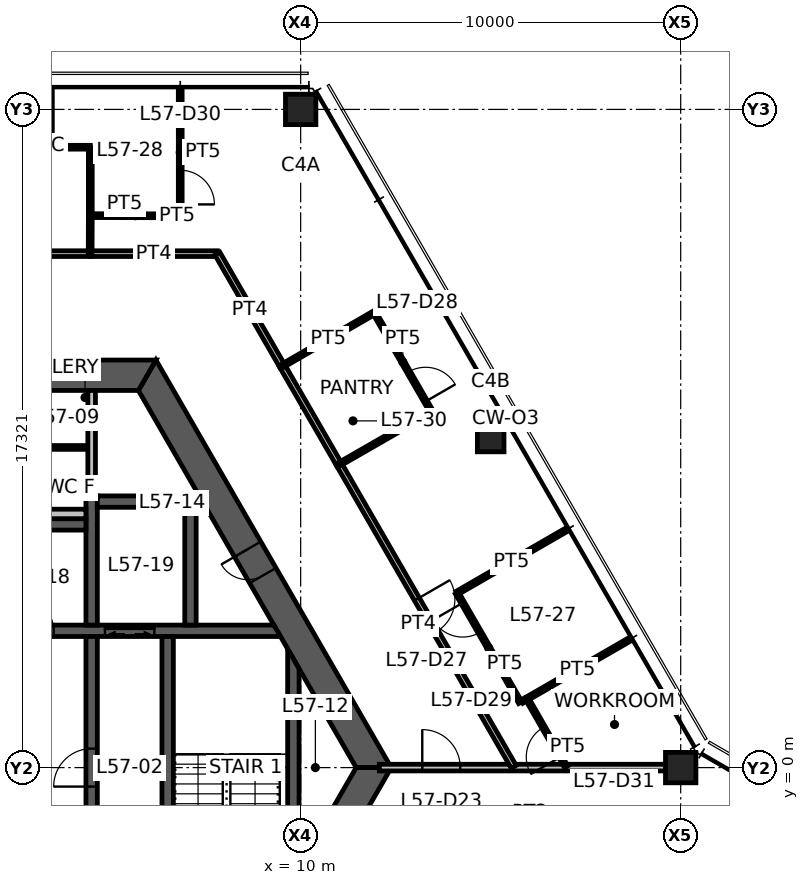
"""IFC4 building model, lengths in metres.
Left out: names, types, materials, properties, quantities, classifications, styles, units other than length and angle.
Written with IfcOpenShell. Run it as: python <this file> out.ifc"""

import sys

from ifc_helpers import new_model, si_unit, direction, frame, frame_2d, origin, origin_2d, place, context, subcontext, project, spatial, polyline, rectangle, hollow_rectangle, outline, extrude, element, fill, save


model = new_model("IFC4")
c1 = context("Model", 3, precision=1e-05, world=origin(), true_north=direction((0.0, 1.0)))
c2 = subcontext(c1, "Body", "Model", "MODEL_VIEW")
j1 = project(units=[si_unit("LENGTHUNIT", "METRE"), si_unit("PLANEANGLEUNIT", "RADIAN")], contexts=[c1])
p1 = place(None, origin())
s1 = spatial("IfcSite", under=j1, at=p1, CompositionType="ELEMENT")
p2 = place(p1, origin())
s2 = spatial("IfcBuilding", under=s1, at=p2, CompositionType="ELEMENT")
p3 = place(p2, frame((0.0, 0.0, 228.4)))
s3 = spatial("IfcBuildingStorey", under=s2, at=p3, CompositionType="ELEMENT", Elevation=228.4)
for number, where, z_axis, x_axis in (
    (1, (20.0, 0.0, 0.0), (0.0, 0.0, 1.0), (1.0, 0.0, 0.0)),
    (2, (10.0, 17.321, 0.0), (0.0, 0.0, 1.0), (1.0, 0.0, 0.0)),
):
    element("IfcColumn", number, at=place(p3, frame(where, z_axis=z_axis, x_axis=x_axis)), inside=s3, PredefinedType="COLUMN", context=c2, shape_type="SweptSolid", body=[
        extrude(hollow_rectangle(XDim=0.8, YDim=0.8, WallThickness=0.04, at=origin_2d()), origin(), (0.0, 0.0, 1.0), 3.9),
    ])
p4 = place(p3, frame((15.0, 8.66, 0.0), z_axis=(0.0, 0.0, 1.0), x_axis=(1.0, 0.0, 0.0)))
e3 = element("IfcColumn", 3, at=p4, inside=s3, PredefinedType="COLUMN", context=c2, shape_type="SweptSolid", body=[
    extrude(hollow_rectangle(XDim=0.7, YDim=0.7, WallThickness=0.032, at=origin_2d()), origin(), (0.0, 0.0, 1.0), 3.9),
])
p5 = place(p3, frame((11.922, 0.0, 0.0), z_axis=(0.0, 0.0, 1.0), x_axis=(-0.500004296715, 0.866022923061, 0.0)))
e4 = element("IfcWall", 4, at=p5, inside=s3, PredefinedType="SHEAR", context=c2, shape_type="SweptSolid", body=[
    extrude(outline(polyline([(-0.231, -0.4), (5.835, -0.4), (6.635, -0.4), (12.153, -0.4), (11.691, 0.4), (6.635, 0.4), (5.835, 0.4), (0.231, 0.4), (-0.231, -0.4)])), origin(), (0.0, 0.0, 1.0), 3.9),
])
p6 = place(p5, frame((5.835, 0.0, 0.0)))
e5 = element("IfcOpeningElement", 5, at=p6, cuts=e4, PredefinedType="OPENING", context=c2, shape_type="SweptSolid", body=[
    extrude(rectangle(XDim=0.8, YDim=2.1, at=frame_2d((0.4, 1.05))), frame((0.0, 0.41, 0.0), z_axis=(0.0, -1.0, 0.0), x_axis=(1.0, 0.0, 0.0)), (0.0, 0.0, 1.0), 0.82),
])
p7 = place(p3, frame((5.961, 10.325, 0.0), z_axis=(0.0, 0.0, 1.0), x_axis=(-1.0, 0.0, 0.0)))
e6 = element("IfcWall", 6, at=p7, inside=s3, PredefinedType="SHEAR", context=c2, shape_type="SweptSolid", body=[
    extrude(outline(polyline([(-0.231, -0.4), (4.636, -0.4), (5.536, -0.4), (6.386, -0.4), (7.286, -0.4), (12.153, -0.4), (11.691, 0.4), (7.286, 0.4), (6.386, 0.4), (5.536, 0.4), (4.636, 0.4), (0.231, 0.4), (-0.231, -0.4)])), origin(), (0.0, 0.0, 1.0), 3.9),
])
p8 = place(p7, frame((6.386, 0.0, 0.0)))
e7 = element("IfcOpeningElement", 7, at=p8, cuts=e6, PredefinedType="OPENING", context=c2, shape_type="SweptSolid", body=[
    extrude(rectangle(XDim=0.9, YDim=2.1, at=frame_2d((0.45, 1.05))), frame((0.0, 0.41, 0.0), z_axis=(0.0, -1.0, 0.0), x_axis=(1.0, 0.0, 0.0)), (0.0, 0.0, 1.0), 0.82),
])
p9 = place(p7, frame((4.636, 0.0, 0.0)))
e8 = element("IfcOpeningElement", 8, at=p9, cuts=e6, PredefinedType="OPENING", context=c2, shape_type="SweptSolid", body=[
    extrude(rectangle(XDim=0.9, YDim=2.1, at=frame_2d((0.45, 1.05))), frame((0.0, 0.41, 0.0), z_axis=(0.0, -1.0, 0.0), x_axis=(1.0, 0.0, 0.0)), (0.0, 0.0, 1.0), 0.82),
])
p10 = place(p3, frame((5.961, -10.325, 0.0), z_axis=(0.0, 0.0, 1.0), x_axis=(0.500004296715, 0.866022923061, 0.0)))
e9 = element("IfcWall", 9, at=p10, inside=s3, PredefinedType="SHEAR", context=c2, shape_type="SweptSolid", body=[
    extrude(outline(polyline([(-0.231, -0.4), (4.594, -0.4), (5.394, -0.4), (12.153, -0.4), (11.691, 0.4), (5.394, 0.4), (4.594, 0.4), (0.231, 0.4), (-0.231, -0.4)])), origin(), (0.0, 0.0, 1.0), 3.9),
])
p11 = place(p10, frame((4.594, 0.0, 0.0)))
e10 = element("IfcOpeningElement", 10, at=p11, cuts=e9, PredefinedType="OPENING", context=c2, shape_type="SweptSolid", body=[
    extrude(rectangle(XDim=0.8, YDim=2.1, at=frame_2d((0.4, 1.05))), frame((0.0, 0.41, 0.0), z_axis=(0.0, -1.0, 0.0), x_axis=(1.0, 0.0, 0.0)), (0.0, 0.0, 1.0), 0.82),
])
p12 = place(p3, frame((1.45, 3.6, 0.0), z_axis=(0.0, 0.0, 1.0), x_axis=(1.0, 0.0, 0.0)))
e11 = element("IfcWall", 11, at=p12, inside=s3, PredefinedType="SHEAR", context=c2, shape_type="SweptSolid", body=[
    extrude(outline(polyline([(0.0, -0.15), (1.15, -0.15), (2.05, -0.15), (3.4, -0.15), (4.7, -0.15), (8.019, -0.15), (7.845, 0.15), (4.7, 0.15), (3.4, 0.15), (2.05, 0.15), (1.15, 0.15), (0.0, 0.15), (0.0, -0.15)])), origin(), (0.0, 0.0, 1.0), 3.9),
])
p13 = place(p12, frame((1.15, 0.0, 0.0)))
e12 = element("IfcOpeningElement", 12, at=p13, cuts=e11, PredefinedType="OPENING", context=c2, shape_type="SweptSolid", body=[
    extrude(rectangle(XDim=0.9, YDim=2.1, at=frame_2d((0.45, 1.05))), frame((0.0, 0.16, 0.0), z_axis=(0.0, -1.0, 0.0), x_axis=(1.0, 0.0, 0.0)), (0.0, 0.0, 1.0), 0.32),
])
p14 = place(p12, frame((3.4, 0.0, 0.0)))
e13 = element("IfcOpeningElement", 13, at=p14, cuts=e11, PredefinedType="OPENING", context=c2, shape_type="SweptSolid", body=[
    extrude(rectangle(XDim=1.3, YDim=2.1, at=frame_2d((0.65, 1.05))), frame((0.0, 0.16, 0.0), z_axis=(0.0, -1.0, 0.0), x_axis=(1.0, 0.0, 0.0)), (0.0, 0.0, 1.0), 0.32),
])
p15 = place(p3, frame((4.5, -3.45, 0.0), z_axis=(0.0, 0.0, 1.0), x_axis=(0.0, 1.0, 0.0)))
e14 = element("IfcWall", 14, at=p15, inside=s3, PredefinedType="SHEAR", context=c2, shape_type="SweptSolid", body=[
    extrude(rectangle(XDim=6.9, YDim=0.3, at=frame_2d((3.45, 0.0))), origin(), (0.0, 0.0, 1.0), 3.9),
])
p16 = place(p15, frame((2.95, 0.0, 0.0)))
e15 = element("IfcOpeningElement", 15, at=p16, cuts=e14, PredefinedType="OPENING", context=c2, shape_type="SweptSolid", body=[
    extrude(rectangle(XDim=1.0, YDim=2.1, at=frame_2d((0.5, 1.05))), frame((0.0, 0.16, 0.0), z_axis=(0.0, -1.0, 0.0), x_axis=(1.0, 0.0, 0.0)), (0.0, 0.0, 1.0), 0.32),
])
p17 = place(p3, frame((6.5, -3.45, 0.0), z_axis=(0.0, 0.0, 1.0), x_axis=(0.0, 1.0, 0.0)))
e16 = element("IfcWall", 16, at=p17, inside=s3, PredefinedType="SHEAR", context=c2, shape_type="SweptSolid", body=[
    extrude(rectangle(XDim=6.9, YDim=0.3, at=frame_2d((3.45, 0.0))), origin(), (0.0, 0.0, 1.0), 3.9),
])
p18 = place(p17, frame((0.1, 0.0, 0.0)))
e17 = element("IfcOpeningElement", 17, at=p18, cuts=e16, PredefinedType="OPENING", context=c2, shape_type="SweptSolid", body=[
    extrude(rectangle(XDim=1.0, YDim=2.1, at=frame_2d((0.5, 1.05))), frame((0.0, 0.16, 0.0), z_axis=(0.0, -1.0, 0.0), x_axis=(1.0, 0.0, 0.0)), (0.0, 0.0, 1.0), 0.32),
])
p19 = place(p3, frame((4.5, 3.75, 0.0), z_axis=(0.0, 0.0, 1.0), x_axis=(0.0, 1.0, 0.0)))
e18 = element("IfcWall", 18, at=p19, inside=s3, PredefinedType="SHEAR", context=c2, shape_type="SweptSolid", body=[
    extrude(rectangle(XDim=3.4, YDim=0.3, at=frame_2d((1.7, 0.0))), origin(), (0.0, 0.0, 1.0), 3.9),
])
for number, where, z_axis, x_axis in (
    (19, (1.75, 6.4, 0.0), (0.0, 0.0, 1.0), (1.0, 0.0, 0.0)),
    (20, (4.65, 7.0, 0.0), (0.0, 0.0, 1.0), (1.0, 0.0, 0.0)),
):
    element("IfcWall", number, at=place(p3, frame(where, z_axis=z_axis, x_axis=x_axis)), inside=s3, PredefinedType="SHEAR", context=c2, shape_type="SweptSolid", body=[
        extrude(rectangle(XDim=2.6, YDim=0.3, at=frame_2d((1.3, 0.0))), origin(), (0.0, 0.0, 1.0), 3.9),
    ])
p20 = place(p3, frame((7.1, 3.75, 0.0), z_axis=(0.0, 0.0, 1.0), x_axis=(0.0, 1.0, 0.0)))
e21 = element("IfcWall", 21, at=p20, inside=s3, PredefinedType="SHEAR", context=c2, shape_type="SweptSolid", body=[
    extrude(rectangle(XDim=3.1, YDim=0.3, at=frame_2d((1.55, 0.0))), origin(), (0.0, 0.0, 1.0), 3.9),
])
p21 = place(p3, frame((9.808, -2.862, 0.0), z_axis=(0.0, 0.0, 1.0), x_axis=(0.0, 1.0, 0.0)))
e22 = element("IfcWall", 22, at=p21, inside=s3, PredefinedType="SHEAR", context=c2, shape_type="SweptSolid", body=[
    extrude(outline(polyline([(0.26, -0.15), (5.465, -0.15), (5.984, 0.15), (-0.26, 0.15), (0.26, -0.15)])), origin(), (0.0, 0.0, 1.0), 3.9),
])
p22 = place(p3, frame((4.5, 7.15, 0.0), z_axis=(0.0, 0.0, 1.0), x_axis=(0.0, 1.0, 0.0)))
e23 = element("IfcWall", 23, at=p22, inside=s3, PredefinedType="STANDARD", context=c2, shape_type="SweptSolid", body=[
    extrude(rectangle(XDim=2.775, YDim=0.2, at=frame_2d((1.388, 0.0))), origin(), (0.0, 0.0, 1.0), 3.9),
])
p23 = place(p3, frame((1.75, 6.675, 0.0), z_axis=(0.0, 0.0, 1.0), x_axis=(1.0, 0.0, 0.0)))
e24 = element("IfcWall", 24, at=p23, inside=s3, PredefinedType="PLUMBINGWALL", context=c2, shape_type="SweptSolid", body=[
    extrude(rectangle(XDim=2.6, YDim=0.25, at=frame_2d((1.3, 0.0))), origin(), (0.0, 0.0, 1.0), 3.9),
])
p24 = place(p3, frame((3.3, 8.425, 0.0), z_axis=(0.0, 0.0, 1.0), x_axis=(1.0, 0.0, 0.0)))
e25 = element("IfcWall", 25, at=p24, inside=s3, PredefinedType="PARTITIONING", context=c2, shape_type="SweptSolid", body=[
    extrude(rectangle(XDim=1.05, YDim=0.1, at=frame_2d((0.525, 0.0))), origin(), (0.0, 0.0, 1.0), 2.95),
])
p25 = place(p3, frame((12.07, 0.0, 0.0), z_axis=(0.0, 0.0, 1.0), x_axis=(1.0, 0.0, 0.0)))
e26 = element("IfcWall", 26, at=p25, inside=s3, PredefinedType="PARTITIONING", context=c2, shape_type="SweptSolid", body=[
    extrude(rectangle(XDim=7.93, YDim=0.175, at=frame_2d((3.965, 0.0))), origin(), (0.0, 0.0, 1.0), 3.05),
])
p26 = place(p25, frame((1.13, 0.0, 0.0)))
e27 = element("IfcOpeningElement", 27, at=p26, cuts=e26, PredefinedType="OPENING", context=c2, shape_type="SweptSolid", body=[
    extrude(rectangle(XDim=1.0, YDim=2.1, at=frame_2d((0.5, 1.05))), frame((0.0, 0.098, 0.0), z_axis=(0.0, -1.0, 0.0), x_axis=(1.0, 0.0, 0.0)), (0.0, 0.0, 1.0), 0.195),
])
p27 = place(p3, frame((0.32, 13.525, 0.0), z_axis=(0.0, 0.0, 1.0), x_axis=(1.0, 0.0, 0.0)))
e28 = element("IfcWall", 28, at=p27, inside=s3, PredefinedType="PARTITIONING", context=c2, shape_type="SweptSolid", body=[
    extrude(rectangle(XDim=4.15, YDim=0.15, at=frame_2d((2.075, 0.0))), origin(), (0.0, 0.0, 1.0), 2.95),
])
p28 = place(p27, frame((1.575, 0.0, 0.0)))
e29 = element("IfcOpeningElement", 29, at=p28, cuts=e28, PredefinedType="OPENING", context=c2, shape_type="SweptSolid", body=[
    extrude(rectangle(XDim=1.0, YDim=2.1, at=frame_2d((0.5, 1.05))), frame((0.0, 0.085, 0.0), z_axis=(0.0, -1.0, 0.0), x_axis=(1.0, 0.0, 0.0)), (0.0, 0.0, 1.0), 0.17),
])
p29 = place(p3, frame((9.51, 10.577, 0.0), z_axis=(0.0, 0.0, 1.0), x_axis=(0.499977562641, -0.866038357612, 0.0)))
e30 = element("IfcWall", 30, at=p29, inside=s3, PredefinedType="PARTITIONING", context=c2, shape_type="SweptSolid", body=[
    extrude(rectangle(XDim=3.01, YDim=0.15, at=frame_2d((1.505, 0.0))), origin(), (0.0, 0.0, 1.0), 2.95),
])
p30 = place(p3, frame((4.46, 13.525, 0.0), z_axis=(0.0, 0.0, 1.0), x_axis=(1.0, 0.0, 0.0)))
e31 = element("IfcWall", 31, at=p30, inside=s3, PredefinedType="PARTITIONING", context=c2, shape_type="SweptSolid", body=[
    extrude(rectangle(XDim=3.348, YDim=0.15, at=frame_2d((1.674, 0.0))), origin(), (0.0, 0.0, 1.0), 2.95),
])
p31 = place(p3, frame((7.809, 13.525, 0.0), z_axis=(0.0, 0.0, 1.0), x_axis=(0.500001088571, -0.866024775297, 0.0)))
e32 = element("IfcWall", 32, at=p31, inside=s3, PredefinedType="PARTITIONING", context=c2, shape_type="SweptSolid", body=[
    extrude(rectangle(XDim=3.413, YDim=0.15, at=frame_2d((1.707, 0.0))), origin(), (0.0, 0.0, 1.0), 2.95),
])
p32 = place(p3, frame((11.011, 7.979, 0.0), z_axis=(0.0, 0.0, 1.0), x_axis=(0.49999917462, -0.866025880317, 0.0)))
e33 = element("IfcWall", 33, at=p32, inside=s3, PredefinedType="PARTITIONING", context=c2, shape_type="SweptSolid", body=[
    extrude(rectangle(XDim=9.19, YDim=0.15, at=frame_2d((4.595, 0.0))), origin(), (0.0, 0.0, 1.0), 2.95),
])
p33 = place(p32, frame((4.095, 0.0, 0.0)))
e34 = element("IfcOpeningElement", 34, at=p33, cuts=e33, PredefinedType="OPENING", context=c2, shape_type="SweptSolid", body=[
    extrude(rectangle(XDim=1.0, YDim=2.1, at=frame_2d((0.5, 1.05))), frame((0.0, 0.085, 0.0), z_axis=(0.0, -1.0, 0.0), x_axis=(1.0, 0.0, 0.0)), (0.0, 0.0, 1.0), 0.17),
])
p34 = place(p3, frame((3.415, 16.325, 0.0), z_axis=(0.0, 0.0, 1.0), x_axis=(1.0, 0.0, 0.0)))
e35 = element("IfcWall", 35, at=p34, inside=s3, PredefinedType="PARTITIONING", context=c2, shape_type="SweptSolid", body=[
    extrude(rectangle(XDim=1.05, YDim=0.1, at=frame_2d((0.525, 0.0))), origin(), (0.0, 0.0, 1.0), 2.95),
])
p35 = place(p3, frame((4.465, 16.325, 0.0), z_axis=(0.0, 0.0, 1.0), x_axis=(0.0, -1.0, 0.0)))
e36 = element("IfcWall", 36, at=p35, inside=s3, PredefinedType="PARTITIONING", context=c2, shape_type="SweptSolid", body=[
    extrude(rectangle(XDim=1.81, YDim=0.1, at=frame_2d((0.905, 0.0))), origin(), (0.0, 0.0, 1.0), 2.95),
])
p36 = place(p3, frame((4.465, 14.525, 0.0), z_axis=(0.0, 0.0, 1.0), x_axis=(-0.00463862197, -0.999989241535, 0.0)))
e37 = element("IfcWall", 37, at=p36, inside=s3, PredefinedType="PARTITIONING", context=c2, shape_type="SweptSolid", body=[
    extrude(rectangle(XDim=1.0, YDim=0.1, at=frame_2d((0.5, 0.0))), origin(), (0.0, 0.0, 1.0), 2.95),
])
p37 = place(p3, frame((9.515, 10.569, 0.0), z_axis=(0.0, 0.0, 1.0), x_axis=(0.865255114713, 0.501331812737, 0.0)))
e38 = element("IfcWall", 38, at=p37, inside=s3, PredefinedType="PARTITIONING", context=c2, shape_type="SweptSolid", body=[
    extrude(rectangle(XDim=2.8, YDim=0.1, at=frame_2d((1.4, 0.0))), origin(), (0.0, 0.0, 1.0), 2.95),
])
p38 = place(p3, frame((11.938, 11.973, 0.0), z_axis=(0.0, 0.0, 1.0), x_axis=(0.50002537861, -0.866010750942, 0.0)))
e39 = element("IfcWall", 39, at=p38, inside=s3, PredefinedType="PARTITIONING", context=c2, shape_type="SweptSolid", body=[
    extrude(rectangle(XDim=3.0, YDim=0.1, at=frame_2d((1.5, 0.0))), origin(), (0.0, 0.0, 1.0), 2.95),
])
p39 = place(p38, frame((1.8, 0.0, 0.0)))
e40 = element("IfcOpeningElement", 40, at=p39, cuts=e39, PredefinedType="OPENING", context=c2, shape_type="SweptSolid", body=[
    extrude(rectangle(XDim=0.9, YDim=2.1, at=frame_2d((0.45, 1.05))), frame((0.0, 0.06, 0.0), z_axis=(0.0, -1.0, 0.0), x_axis=(1.0, 0.0, 0.0)), (0.0, 0.0, 1.0), 0.12),
])
p40 = place(p3, frame((13.438, 9.375, 0.0), z_axis=(0.0, 0.0, 1.0), x_axis=(-0.866817750494, -0.498625097071, 0.0)))
e41 = element("IfcWall", 41, at=p40, inside=s3, PredefinedType="PARTITIONING", context=c2, shape_type="SweptSolid", body=[
    extrude(rectangle(XDim=2.8, YDim=0.1, at=frame_2d((1.4, 0.0))), origin(), (0.0, 0.0, 1.0), 2.95),
])
p41 = place(p3, frame((18.62, 3.351, 0.0), z_axis=(0.0, 0.0, 1.0), x_axis=(-0.866043267704, -0.499969057507, 0.0)))
e42 = element("IfcWall", 42, at=p41, inside=s3, PredefinedType="PARTITIONING", context=c2, shape_type="SweptSolid", body=[
    extrude(rectangle(XDim=3.085, YDim=0.1, at=frame_2d((1.542, 0.0))), origin(), (0.0, 0.0, 1.0), 2.95),
])
p42 = place(p3, frame((14.114, 4.595, 0.0), z_axis=(0.0, 0.0, 1.0), x_axis=(0.866033287653, 0.49998634449, 0.0)))
e43 = element("IfcWall", 43, at=p42, inside=s3, PredefinedType="PARTITIONING", context=c2, shape_type="SweptSolid", body=[
    extrude(rectangle(XDim=3.31, YDim=0.1, at=frame_2d((1.655, 0.0))), origin(), (0.0, 0.0, 1.0), 2.95),
])
p43 = place(p3, frame((15.779, 1.71, 0.0), z_axis=(0.0, 0.0, 1.0), x_axis=(-0.500001606164, 0.866024476463, 0.0)))
e44 = element("IfcWall", 44, at=p43, inside=s3, PredefinedType="PARTITIONING", context=c2, shape_type="SweptSolid", body=[
    extrude(rectangle(XDim=3.331, YDim=0.1, at=frame_2d((1.666, 0.0))), origin(), (0.0, 0.0, 1.0), 2.95),
])
p44 = place(p43, frame((2.131, 0.0, 0.0)))
e45 = element("IfcOpeningElement", 45, at=p44, cuts=e44, PredefinedType="OPENING", context=c2, shape_type="SweptSolid", body=[
    extrude(rectangle(XDim=0.9, YDim=2.1, at=frame_2d((0.45, 1.05))), frame((0.0, 0.06, 0.0), z_axis=(0.0, -1.0, 0.0), x_axis=(1.0, 0.0, 0.0)), (0.0, 0.0, 1.0), 0.12),
])
p45 = place(p3, frame((6.831, 14.521, 0.0), z_axis=(0.0, 0.0, 1.0), x_axis=(-0.999998274693, 0.001857581934, 0.0)))
e46 = element("IfcWall", 46, at=p45, inside=s3, PredefinedType="PARTITIONING", context=c2, shape_type="SweptSolid", body=[
    extrude(rectangle(XDim=2.366, YDim=0.1, at=frame_2d((1.183, 0.0))), origin(), (0.0, 0.0, 1.0), 2.95),
])
p46 = place(p3, frame((6.831, 17.855, 0.0), z_axis=(0.0, 0.0, 1.0), x_axis=(0.0, -1.0, 0.0)))
e47 = element("IfcWall", 47, at=p46, inside=s3, PredefinedType="PARTITIONING", context=c2, shape_type="SweptSolid", body=[
    extrude(rectangle(XDim=3.335, YDim=0.1, at=frame_2d((1.667, 0.0))), origin(), (0.0, 0.0, 1.0), 2.95),
])
p47 = place(p46, frame((2.135, 0.0, 0.0)))
e48 = element("IfcOpeningElement", 48, at=p47, cuts=e47, PredefinedType="OPENING", context=c2, shape_type="SweptSolid", body=[
    extrude(rectangle(XDim=0.9, YDim=2.1, at=frame_2d((0.45, 1.05))), frame((0.0, 0.06, 0.0), z_axis=(0.0, -1.0, 0.0), x_axis=(1.0, 0.0, 0.0)), (0.0, 0.0, 1.0), 0.12),
])
p48 = place(p3, frame((16.986, 0.02, 0.0), z_axis=(0.0, 0.0, 1.0), x_axis=(-0.498096123952, 0.867121820337, 0.0)))
e49 = element("IfcWall", 49, at=p48, inside=s3, PredefinedType="PARTITIONING", context=c2, shape_type="SweptSolid", body=[
    extrude(rectangle(XDim=2.067, YDim=0.1, at=frame_2d((1.034, 0.0))), origin(), (0.0, 0.0, 1.0), 2.95),
])
p49 = place(p48, frame((0.3, 0.0, 0.0)))
e50 = element("IfcOpeningElement", 50, at=p49, cuts=e49, PredefinedType="OPENING", context=c2, shape_type="SweptSolid", body=[
    extrude(rectangle(XDim=0.9, YDim=2.1, at=frame_2d((0.45, 1.05))), frame((0.0, 0.06, 0.0), z_axis=(0.0, -1.0, 0.0), x_axis=(1.0, 0.0, 0.0)), (0.0, 0.0, 1.0), 0.12),
])
p50 = place(p3, frame((15.823, 1.735, 0.0), z_axis=(0.0, 0.0, 1.0), x_axis=(0.867234405398, 0.497900076415, 0.0)))
e51 = element("IfcWall", 51, at=p50, inside=s3, PredefinedType="PARTITIONING", context=c2, shape_type="SweptSolid", body=[
    extrude(rectangle(XDim=0.104, YDim=0.1, at=frame_2d((0.052, 0.0))), origin(), (0.0, 0.0, 1.0), 2.95),
])
p51 = place(p6, origin())
e52 = element("IfcDoor", 52, at=p51, inside=s3, OperationType="SINGLE_SWING_RIGHT", PredefinedType="DOOR", context=c2, shape_type="SweptSolid", body=[
    extrude(rectangle(XDim=0.8, YDim=2.1, at=frame_2d((0.4, 1.05))), frame((0.0, 0.025, 0.0), z_axis=(0.0, -1.0, 0.0), x_axis=(1.0, 0.0, 0.0)), (0.0, 0.0, 1.0), 0.05),
])
fill(e5, e52)
p52 = place(p16, origin())
e53 = element("IfcDoor", 53, at=p52, inside=s3, OperationType="SINGLE_SWING_LEFT", PredefinedType="DOOR", context=c2, shape_type="SweptSolid", body=[
    extrude(rectangle(XDim=1.0, YDim=2.1, at=frame_2d((0.5, 1.05))), frame((0.0, 0.025, 0.0), z_axis=(0.0, -1.0, 0.0), x_axis=(1.0, 0.0, 0.0)), (0.0, 0.0, 1.0), 0.05),
])
fill(e15, e53)
p53 = place(p13, origin())
e54 = element("IfcDoor", 54, at=p53, inside=s3, OperationType="SINGLE_SWING_LEFT", PredefinedType="DOOR", context=c2, shape_type="SweptSolid", body=[
    extrude(rectangle(XDim=0.9, YDim=2.1, at=frame_2d((0.45, 1.05))), frame((0.0, 0.025, 0.0), z_axis=(0.0, -1.0, 0.0), x_axis=(1.0, 0.0, 0.0)), (0.0, 0.0, 1.0), 0.05),
])
fill(e12, e54)
p54 = place(p26, origin())
e55 = element("IfcDoor", 55, at=p54, inside=s3, OperationType="SINGLE_SWING_LEFT", PredefinedType="DOOR", context=c2, shape_type="SweptSolid", body=[
    extrude(rectangle(XDim=1.0, YDim=2.1, at=frame_2d((0.5, 1.05))), frame((0.0, 0.025, 0.0), z_axis=(0.0, -1.0, 0.0), x_axis=(1.0, 0.0, 0.0)), (0.0, 0.0, 1.0), 0.05),
])
fill(e27, e55)
p55 = place(p33, origin())
e56 = element("IfcDoor", 56, at=p55, inside=s3, OperationType="SINGLE_SWING_LEFT", PredefinedType="DOOR", context=c2, shape_type="SweptSolid", body=[
    extrude(rectangle(XDim=1.0, YDim=2.1, at=frame_2d((0.5, 1.05))), frame((0.0, 0.025, 0.0), z_axis=(0.0, -1.0, 0.0), x_axis=(1.0, 0.0, 0.0)), (0.0, 0.0, 1.0), 0.05),
])
fill(e34, e56)
p56 = place(p39, origin())
e57 = element("IfcDoor", 57, at=p56, inside=s3, OperationType="SINGLE_SWING_RIGHT", PredefinedType="DOOR", context=c2, shape_type="SweptSolid", body=[
    extrude(rectangle(XDim=0.9, YDim=2.1, at=frame_2d((0.45, 1.05))), frame((0.0, 0.025, 0.0), z_axis=(0.0, -1.0, 0.0), x_axis=(1.0, 0.0, 0.0)), (0.0, 0.0, 1.0), 0.05),
])
fill(e40, e57)
p57 = place(p44, origin())
e58 = element("IfcDoor", 58, at=p57, inside=s3, OperationType="SINGLE_SWING_RIGHT", PredefinedType="DOOR", context=c2, shape_type="SweptSolid", body=[
    extrude(rectangle(XDim=0.9, YDim=2.1, at=frame_2d((0.45, 1.05))), frame((0.0, 0.025, 0.0), z_axis=(0.0, -1.0, 0.0), x_axis=(1.0, 0.0, 0.0)), (0.0, 0.0, 1.0), 0.05),
])
fill(e45, e58)
p58 = place(p47, origin())
e59 = element("IfcDoor", 59, at=p58, inside=s3, OperationType="SINGLE_SWING_RIGHT", PredefinedType="DOOR", context=c2, shape_type="SweptSolid", body=[
    extrude(rectangle(XDim=0.9, YDim=2.1, at=frame_2d((0.45, 1.05))), frame((0.0, 0.025, 0.0), z_axis=(0.0, -1.0, 0.0), x_axis=(1.0, 0.0, 0.0)), (0.0, 0.0, 1.0), 0.05),
])
fill(e48, e59)
p59 = place(p49, origin())
e60 = element("IfcDoor", 60, at=p59, inside=s3, OperationType="SINGLE_SWING_LEFT", PredefinedType="DOOR", context=c2, shape_type="SweptSolid", body=[
    extrude(rectangle(XDim=0.9, YDim=2.1, at=frame_2d((0.45, 1.05))), frame((0.0, 0.025, 0.0), z_axis=(0.0, -1.0, 0.0), x_axis=(1.0, 0.0, 0.0)), (0.0, 0.0, 1.0), 0.05),
])
fill(e50, e60)
p60 = place(p14, origin())
e61 = element("IfcDoor", 61, at=p60, inside=s3, OperationType="DOUBLE_DOOR_SLIDING", PredefinedType="DOOR", context=c2, shape_type="SweptSolid", body=[
    extrude(rectangle(XDim=1.3, YDim=2.1, at=frame_2d((0.65, 1.05))), frame((0.0, 0.025, 0.0), z_axis=(0.0, -1.0, 0.0), x_axis=(1.0, 0.0, 0.0)), (0.0, 0.0, 1.0), 0.05),
])
fill(e13, e61)
save(model, sys.argv[1])
